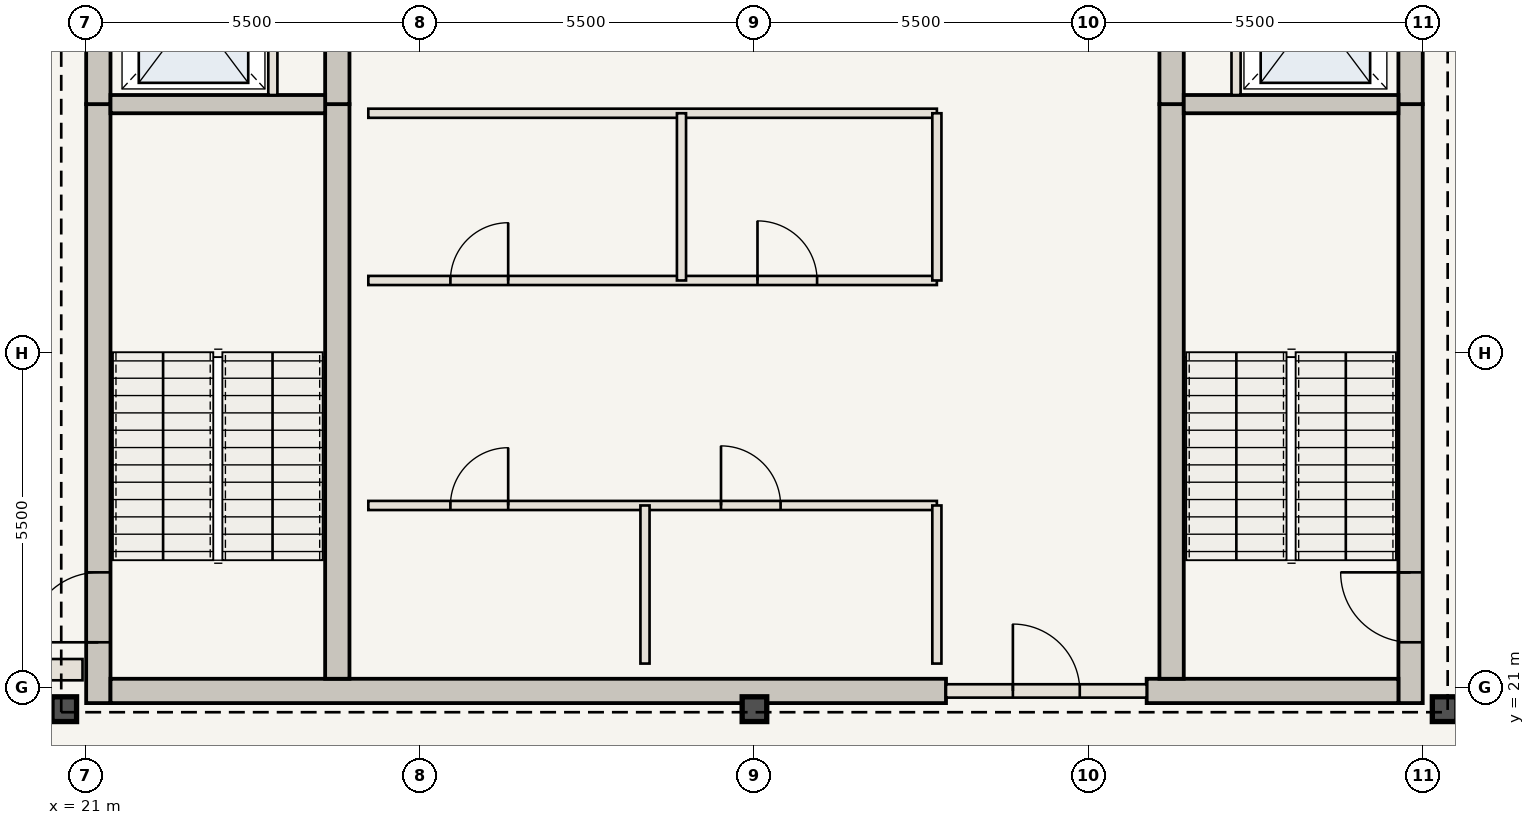
"""IFC4 building model, lengths in metres.
Left out: names, types, materials, properties, quantities, classifications, styles, units other than length and angle.
Written with IfcOpenShell. Run it as: python <this file> out.ifc"""

import sys

from ifc_helpers import new_model, si_unit, direction, frame, frame_2d, origin, origin_2d, place, context, subcontext, project, spatial, rectangle, i_section, extrude, element, fill, save


model = new_model("IFC4")
c1 = context("Model", 3, precision=1e-05, world=origin(), true_north=direction((0.0, 1.0)))
c2 = subcontext(c1, "Body", "Model", "MODEL_VIEW")
j1 = project(units=[si_unit("LENGTHUNIT", "METRE"), si_unit("PLANEANGLEUNIT", "RADIAN")], contexts=[c1])
p1 = place(None, origin())
s1 = spatial("IfcSite", under=j1, at=p1, CompositionType="ELEMENT")
p2 = place(p1, origin())
s2 = spatial("IfcBuilding", under=s1, at=p2, CompositionType="ELEMENT")
p3 = place(p2, frame((0.0, 0.0, 322.35)))
s3 = spatial("IfcBuildingStorey", under=s2, at=p3, CompositionType="ELEMENT", Elevation=322.35)
p4 = place(p3, frame((21.21, 20.75, 0.0), z_axis=(0.0, 0.0, 1.0), x_axis=(0.0, 1.0, 0.0)))
e1 = element("IfcWall", 1, at=p4, inside=s3, PredefinedType="SHEAR", context=c2, shape_type="SweptSolid", body=[
    extrude(rectangle(XDim=9.85, YDim=0.4, at=frame_2d((4.925, 0.0))), origin(), (0.0, 0.0, 1.0), 4.55),
])
p5 = place(p4, frame((1.0, 0.0, 0.0)))
e2 = element("IfcOpeningElement", 2, at=p5, cuts=e1, PredefinedType="OPENING", context=c2, shape_type="SweptSolid", body=[
    extrude(rectangle(XDim=1.15, YDim=2.15, at=frame_2d((0.575, 1.075))), frame((0.0, 0.21, 0.0), z_axis=(0.0, -1.0, 0.0), x_axis=(1.0, 0.0, 0.0)), (0.0, 0.0, 1.0), 0.42),
])
p6 = place(p3, frame((21.21, 30.6, 0.0), z_axis=(0.0, 0.0, 1.0), x_axis=(0.0, 1.0, 0.0)))
e3 = element("IfcWall", 3, at=p6, inside=s3, PredefinedType="SHEAR", context=c2, shape_type="SweptSolid", body=[
    extrude(rectangle(XDim=12.6, YDim=0.4, at=frame_2d((6.3, 0.0))), origin(), (0.0, 0.0, 1.0), 4.55),
])
p7 = place(p6, frame((4.2, 0.0, 0.0)))
e4 = element("IfcOpeningElement", 4, at=p7, cuts=e3, PredefinedType="OPENING", context=c2, shape_type="SweptSolid", body=[
    extrude(rectangle(XDim=1.1, YDim=2.15, at=frame_2d((0.55, 1.075))), frame((0.0, 0.21, 0.0), z_axis=(0.0, -1.0, 0.0), x_axis=(1.0, 0.0, 0.0)), (0.0, 0.0, 1.0), 0.42),
])
p8 = place(p6, frame((9.2, 0.0, 0.0)))
e5 = element("IfcOpeningElement", 5, at=p8, cuts=e3, PredefinedType="OPENING", context=c2, shape_type="SweptSolid", body=[
    extrude(rectangle(XDim=0.92, YDim=2.1, at=frame_2d((0.46, 1.05))), frame((0.0, 0.21, 0.0), z_axis=(0.0, -1.0, 0.0), x_axis=(1.0, 0.0, 0.0)), (0.0, 0.0, 1.0), 0.42),
])
p9 = place(p3, frame((42.79, 20.75, 0.0), z_axis=(0.0, 0.0, 1.0), x_axis=(0.0, 1.0, 0.0)))
e6 = element("IfcWall", 6, at=p9, inside=s3, PredefinedType="SHEAR", context=c2, shape_type="SweptSolid", body=[
    extrude(rectangle(XDim=9.85, YDim=0.4, at=frame_2d((4.925, 0.0))), origin(), (0.0, 0.0, 1.0), 4.55),
])
p10 = place(p9, frame((1.0, 0.0, 0.0)))
e7 = element("IfcOpeningElement", 7, at=p10, cuts=e6, PredefinedType="OPENING", context=c2, shape_type="SweptSolid", body=[
    extrude(rectangle(XDim=1.15, YDim=2.15, at=frame_2d((0.575, 1.075))), frame((0.0, 0.21, 0.0), z_axis=(0.0, -1.0, 0.0), x_axis=(1.0, 0.0, 0.0)), (0.0, 0.0, 1.0), 0.42),
])
p11 = place(p3, frame((42.79, 30.6, 0.0), z_axis=(0.0, 0.0, 1.0), x_axis=(0.0, 1.0, 0.0)))
e8 = element("IfcWall", 8, at=p11, inside=s3, PredefinedType="SHEAR", context=c2, shape_type="SweptSolid", body=[
    extrude(rectangle(XDim=12.6, YDim=0.4, at=frame_2d((6.3, 0.0))), origin(), (0.0, 0.0, 1.0), 4.55),
])
p12 = place(p11, frame((4.2, 0.0, 0.0)))
e9 = element("IfcOpeningElement", 9, at=p12, cuts=e8, PredefinedType="OPENING", context=c2, shape_type="SweptSolid", body=[
    extrude(rectangle(XDim=1.1, YDim=2.15, at=frame_2d((0.55, 1.075))), frame((0.0, 0.21, 0.0), z_axis=(0.0, -1.0, 0.0), x_axis=(1.0, 0.0, 0.0)), (0.0, 0.0, 1.0), 0.42),
])
p13 = place(p11, frame((8.4, 0.0, 0.0)))
e10 = element("IfcOpeningElement", 10, at=p13, cuts=e8, PredefinedType="OPENING", context=c2, shape_type="SweptSolid", body=[
    extrude(rectangle(XDim=0.88, YDim=2.1, at=frame_2d((0.44, 1.05))), frame((0.0, 0.21, 0.0), z_axis=(0.0, -1.0, 0.0), x_axis=(1.0, 0.0, 0.0)), (0.0, 0.0, 1.0), 0.42),
])
p14 = place(p11, frame((10.5, 0.0, 0.0)))
e11 = element("IfcOpeningElement", 11, at=p14, cuts=e8, PredefinedType="OPENING", context=c2, shape_type="SweptSolid", body=[
    extrude(rectangle(XDim=0.88, YDim=2.1, at=frame_2d((0.44, 1.05))), frame((0.0, 0.21, 0.0), z_axis=(0.0, -1.0, 0.0), x_axis=(1.0, 0.0, 0.0)), (0.0, 0.0, 1.0), 0.42),
])
p15 = place(p3, frame((21.41, 20.95, 0.0), z_axis=(0.0, 0.0, 1.0), x_axis=(1.0, 0.0, 0.0)))
e12 = element("IfcWall", 12, at=p15, inside=s3, PredefinedType="SHEAR", context=c2, shape_type="SweptSolid", body=[
    extrude(rectangle(XDim=13.74, YDim=0.4, at=frame_2d((6.87, 0.0))), origin(), (0.0, 0.0, 1.0), 4.55),
])
p16 = place(p3, frame((38.45, 20.95, 0.0), z_axis=(0.0, 0.0, 1.0), x_axis=(1.0, 0.0, 0.0)))
e13 = element("IfcWall", 13, at=p16, inside=s3, PredefinedType="SHEAR", context=c2, shape_type="SweptSolid", body=[
    extrude(rectangle(XDim=4.14, YDim=0.4, at=frame_2d((2.07, 0.0))), origin(), (0.0, 0.0, 1.0), 4.55),
])
p17 = place(p3, frame((25.14, 21.15, 0.0), z_axis=(0.0, 0.0, 1.0), x_axis=(0.0, 1.0, 0.0)))
e14 = element("IfcWall", 14, at=p17, inside=s3, PredefinedType="SHEAR", context=c2, shape_type="SweptSolid", body=[
    extrude(rectangle(XDim=9.45, YDim=0.4, at=frame_2d((4.725, 0.0))), origin(), (0.0, 0.0, 1.0), 4.55),
])
p18 = place(p3, frame((25.14, 30.6, 0.0), z_axis=(0.0, 0.0, 1.0), x_axis=(0.0, 1.0, 0.0)))
e15 = element("IfcWall", 15, at=p18, inside=s3, PredefinedType="SHEAR", context=c2, shape_type="SweptSolid", body=[
    extrude(rectangle(XDim=12.2, YDim=0.4, at=frame_2d((6.1, 0.0))), origin(), (0.0, 0.0, 1.0), 4.55),
])
p19 = place(p18, frame((6.25, 0.0, 0.0)))
e16 = element("IfcOpeningElement", 16, at=p19, cuts=e15, PredefinedType="OPENING", context=c2, shape_type="SweptSolid", body=[
    extrude(rectangle(XDim=1.1, YDim=2.15, at=frame_2d((0.55, 1.075))), frame((0.0, 0.21, 0.0), z_axis=(0.0, -1.0, 0.0), x_axis=(1.0, 0.0, 0.0)), (0.0, 0.0, 1.0), 0.42),
])
p20 = place(p3, frame((38.86, 21.15, 0.0), z_axis=(0.0, 0.0, 1.0), x_axis=(0.0, 1.0, 0.0)))
e17 = element("IfcWall", 17, at=p20, inside=s3, PredefinedType="SHEAR", context=c2, shape_type="SweptSolid", body=[
    extrude(rectangle(XDim=9.45, YDim=0.4, at=frame_2d((4.725, 0.0))), origin(), (0.0, 0.0, 1.0), 4.55),
])
p21 = place(p3, frame((38.86, 30.6, 0.0), z_axis=(0.0, 0.0, 1.0), x_axis=(0.0, 1.0, 0.0)))
e18 = element("IfcWall", 18, at=p21, inside=s3, PredefinedType="SHEAR", context=c2, shape_type="SweptSolid", body=[
    extrude(rectangle(XDim=12.2, YDim=0.4, at=frame_2d((6.1, 0.0))), origin(), (0.0, 0.0, 1.0), 4.55),
])
for number, where, z_axis, x_axis in (
    (19, (20.65, 20.65, 0.0), (0.0, 0.0, 1.0), (1.0, 0.0, 0.0)),
    (20, (32.0, 20.65, 0.0), (0.0, 0.0, 1.0), (1.0, 0.0, 0.0)),
    (21, (43.35, 20.65, 0.0), (0.0, 0.0, 1.0), (1.0, 0.0, 0.0)),
):
    element("IfcColumn", number, at=place(p3, frame(where, z_axis=z_axis, x_axis=x_axis)), inside=s3, PredefinedType="COLUMN", context=c2, shape_type="SweptSolid", body=[
        extrude(i_section(OverallWidth=0.404, OverallDepth=0.407, WebThickness=0.027, FlangeThickness=0.044, at=origin_2d()), origin(), (0.0, 0.0, 1.0), 4.55),
    ])
for number, where, z_axis, x_axis in (
    (22, (21.41, 30.6, 0.0), (0.0, 0.0, 1.0), (1.0, 0.0, 0.0)),
    (23, (39.06, 30.6, 0.0), (0.0, 0.0, 1.0), (1.0, 0.0, 0.0)),
):
    element("IfcWall", number, at=place(p3, frame(where, z_axis=z_axis, x_axis=x_axis)), inside=s3, PredefinedType="SHEAR", context=c2, shape_type="SweptSolid", body=[
        extrude(rectangle(XDim=3.53, YDim=0.3, at=frame_2d((1.765, 0.0))), origin(), (0.0, 0.0, 1.0), 4.29),
    ])
for number, where, z_axis, x_axis in (
    (24, (24.08, 30.75, 0.0), (0.0, 0.0, 1.0), (0.0, 1.0, 0.0)),
    (25, (39.92, 30.75, 0.0), (0.0, 0.0, 1.0), (0.0, 1.0, 0.0)),
):
    element("IfcWall", number, at=place(p3, frame(where, z_axis=z_axis, x_axis=x_axis)), inside=s3, PredefinedType="STANDARD", context=c2, shape_type="SweptSolid", body=[
        extrude(rectangle(XDim=2.65, YDim=0.15, at=frame_2d((1.325, 0.0))), origin(), (0.0, 0.0, 1.0), 4.29),
    ])
p22 = place(p3, frame((35.15, 20.95, 0.0), z_axis=(0.0, 0.0, 1.0), x_axis=(1.0, 0.0, 0.0)))
e26 = element("IfcWall", 26, at=p22, inside=s3, PredefinedType="STANDARD", context=c2, shape_type="SweptSolid", body=[
    extrude(rectangle(XDim=3.3, YDim=0.22, at=frame_2d((1.65, 0.0))), origin(), (0.0, 0.0, 1.0), 4.29),
])
p23 = place(p22, frame((1.1, 0.0, 0.0)))
e27 = element("IfcOpeningElement", 27, at=p23, cuts=e26, PredefinedType="OPENING", context=c2, shape_type="SweptSolid", body=[
    extrude(rectangle(XDim=1.1, YDim=2.15, at=frame_2d((0.55, 1.075))), frame((0.0, 0.12, 0.0), z_axis=(0.0, -1.0, 0.0), x_axis=(1.0, 0.0, 0.0)), (0.0, 0.0, 1.0), 0.24),
])
p24 = place(p3, frame((25.65, 24.0, 0.0), z_axis=(0.0, 0.0, 1.0), x_axis=(1.0, 0.0, 0.0)))
e28 = element("IfcWall", 28, at=p24, inside=s3, PredefinedType="STANDARD", context=c2, shape_type="SweptSolid", body=[
    extrude(rectangle(XDim=9.35, YDim=0.15, at=frame_2d((4.675, 0.0))), origin(), (0.0, 0.0, 1.0), 4.29),
])
p25 = place(p24, frame((1.35, 0.0, 0.0)))
e29 = element("IfcOpeningElement", 29, at=p25, cuts=e28, PredefinedType="OPENING", context=c2, shape_type="SweptSolid", body=[
    extrude(rectangle(XDim=0.95, YDim=2.15, at=frame_2d((0.475, 1.075))), frame((0.0, 0.085, 0.0), z_axis=(0.0, -1.0, 0.0), x_axis=(1.0, 0.0, 0.0)), (0.0, 0.0, 1.0), 0.17),
])
p26 = place(p24, frame((5.8, 0.0, 0.0)))
e30 = element("IfcOpeningElement", 30, at=p26, cuts=e28, PredefinedType="OPENING", context=c2, shape_type="SweptSolid", body=[
    extrude(rectangle(XDim=0.98, YDim=2.2, at=frame_2d((0.49, 1.1))), frame((0.0, 0.085, 0.0), z_axis=(0.0, -1.0, 0.0), x_axis=(1.0, 0.0, 0.0)), (0.0, 0.0, 1.0), 0.17),
])
for number, where, z_axis, x_axis in (
    (31, (30.2, 21.4, 0.0), (0.0, 0.0, 1.0), (0.0, 1.0, 0.0)),
    (32, (35.0, 21.4, 0.0), (0.0, 0.0, 1.0), (0.0, 1.0, 0.0)),
):
    element("IfcWall", number, at=place(p3, frame(where, z_axis=z_axis, x_axis=x_axis)), inside=s3, PredefinedType="STANDARD", context=c2, shape_type="SweptSolid", body=[
        extrude(rectangle(XDim=2.6, YDim=0.15, at=frame_2d((1.3, 0.0))), origin(), (0.0, 0.0, 1.0), 4.29),
    ])
p27 = place(p3, frame((25.65, 27.7, 0.0), z_axis=(0.0, 0.0, 1.0), x_axis=(1.0, 0.0, 0.0)))
e33 = element("IfcWall", 33, at=p27, inside=s3, PredefinedType="STANDARD", context=c2, shape_type="SweptSolid", body=[
    extrude(rectangle(XDim=9.35, YDim=0.15, at=frame_2d((4.675, 0.0))), origin(), (0.0, 0.0, 1.0), 4.29),
])
p28 = place(p27, frame((1.35, 0.0, 0.0)))
e34 = element("IfcOpeningElement", 34, at=p28, cuts=e33, PredefinedType="OPENING", context=c2, shape_type="SweptSolid", body=[
    extrude(rectangle(XDim=0.95, YDim=2.15, at=frame_2d((0.475, 1.075))), frame((0.0, 0.085, 0.0), z_axis=(0.0, -1.0, 0.0), x_axis=(1.0, 0.0, 0.0)), (0.0, 0.0, 1.0), 0.17),
])
p29 = place(p27, frame((6.4, 0.0, 0.0)))
e35 = element("IfcOpeningElement", 35, at=p29, cuts=e33, PredefinedType="OPENING", context=c2, shape_type="SweptSolid", body=[
    extrude(rectangle(XDim=0.98, YDim=2.2, at=frame_2d((0.49, 1.1))), frame((0.0, 0.085, 0.0), z_axis=(0.0, -1.0, 0.0), x_axis=(1.0, 0.0, 0.0)), (0.0, 0.0, 1.0), 0.17),
])
p30 = place(p3, frame((25.65, 30.45, 0.0), z_axis=(0.0, 0.0, 1.0), x_axis=(1.0, 0.0, 0.0)))
e36 = element("IfcWall", 36, at=p30, inside=s3, PredefinedType="STANDARD", context=c2, shape_type="SweptSolid", body=[
    extrude(rectangle(XDim=9.35, YDim=0.15, at=frame_2d((4.675, 0.0))), origin(), (0.0, 0.0, 1.0), 4.29),
])
for number, where, z_axis, x_axis in (
    (37, (30.8, 27.7, 0.0), (0.0, 0.0, 1.0), (0.0, 1.0, 0.0)),
    (38, (35.0, 27.7, 0.0), (0.0, 0.0, 1.0), (0.0, 1.0, 0.0)),
):
    element("IfcWall", number, at=place(p3, frame(where, z_axis=z_axis, x_axis=x_axis)), inside=s3, PredefinedType="STANDARD", context=c2, shape_type="SweptSolid", body=[
        extrude(rectangle(XDim=2.75, YDim=0.15, at=frame_2d((1.375, 0.0))), origin(), (0.0, 0.0, 1.0), 4.29),
    ])
p31 = place(p3, frame((18.4, 21.3, 0.0), z_axis=(0.0, 0.0, 1.0), x_axis=(1.0, 0.0, 0.0)))
e39 = element("IfcWall", 39, at=p31, inside=s3, PredefinedType="STANDARD", context=c2, shape_type="SweptSolid", body=[
    extrude(rectangle(XDim=2.55, YDim=0.35, at=frame_2d((1.275, 0.0))), origin(), (0.0, 0.0, 1.0), 4.29),
])
p32 = place(p5, origin())
e40 = element("IfcDoor", 40, at=p32, inside=s3, OperationType="SINGLE_SWING_LEFT", PredefinedType="DOOR", context=c2, shape_type="SweptSolid", body=[
    extrude(rectangle(XDim=1.15, YDim=2.15, at=frame_2d((0.575, 1.075))), frame((0.0, 0.025, 0.0), z_axis=(0.0, -1.0, 0.0), x_axis=(1.0, 0.0, 0.0)), (0.0, 0.0, 1.0), 0.05),
])
fill(e2, e40)
p33 = place(p10, origin())
e41 = element("IfcDoor", 41, at=p33, inside=s3, OperationType="SINGLE_SWING_RIGHT", PredefinedType="DOOR", context=c2, shape_type="SweptSolid", body=[
    extrude(rectangle(XDim=1.15, YDim=2.15, at=frame_2d((0.575, 1.075))), frame((0.0, 0.025, 0.0), z_axis=(0.0, -1.0, 0.0), x_axis=(1.0, 0.0, 0.0)), (0.0, 0.0, 1.0), 0.05),
])
fill(e7, e41)
p34 = place(p23, origin())
e42 = element("IfcDoor", 42, at=p34, inside=s3, OperationType="SINGLE_SWING_LEFT", PredefinedType="DOOR", context=c2, shape_type="SweptSolid", body=[
    extrude(rectangle(XDim=1.1, YDim=2.15, at=frame_2d((0.55, 1.075))), frame((0.0, 0.025, 0.0), z_axis=(0.0, -1.0, 0.0), x_axis=(1.0, 0.0, 0.0)), (0.0, 0.0, 1.0), 0.05),
])
fill(e27, e42)
p35 = place(p25, origin())
e43 = element("IfcDoor", 43, at=p35, inside=s3, OperationType="SINGLE_SWING_RIGHT", PredefinedType="DOOR", context=c2, shape_type="SweptSolid", body=[
    extrude(rectangle(XDim=0.95, YDim=2.15, at=frame_2d((0.475, 1.075))), frame((0.0, 0.025, 0.0), z_axis=(0.0, -1.0, 0.0), x_axis=(1.0, 0.0, 0.0)), (0.0, 0.0, 1.0), 0.05),
])
fill(e29, e43)
p36 = place(p26, origin())
e44 = element("IfcDoor", 44, at=p36, inside=s3, OperationType="SINGLE_SWING_LEFT", PredefinedType="DOOR", context=c2, shape_type="SweptSolid", body=[
    extrude(rectangle(XDim=0.98, YDim=2.2, at=frame_2d((0.49, 1.1))), frame((0.0, 0.025, 0.0), z_axis=(0.0, -1.0, 0.0), x_axis=(1.0, 0.0, 0.0)), (0.0, 0.0, 1.0), 0.05),
])
fill(e30, e44)
p37 = place(p28, origin())
e45 = element("IfcDoor", 45, at=p37, inside=s3, OperationType="SINGLE_SWING_RIGHT", PredefinedType="DOOR", context=c2, shape_type="SweptSolid", body=[
    extrude(rectangle(XDim=0.95, YDim=2.15, at=frame_2d((0.475, 1.075))), frame((0.0, 0.025, 0.0), z_axis=(0.0, -1.0, 0.0), x_axis=(1.0, 0.0, 0.0)), (0.0, 0.0, 1.0), 0.05),
])
fill(e34, e45)
p38 = place(p29, origin())
e46 = element("IfcDoor", 46, at=p38, inside=s3, OperationType="SINGLE_SWING_LEFT", PredefinedType="DOOR", context=c2, shape_type="SweptSolid", body=[
    extrude(rectangle(XDim=0.98, YDim=2.2, at=frame_2d((0.49, 1.1))), frame((0.0, 0.025, 0.0), z_axis=(0.0, -1.0, 0.0), x_axis=(1.0, 0.0, 0.0)), (0.0, 0.0, 1.0), 0.05),
])
fill(e35, e46)
save(model, sys.argv[1])
